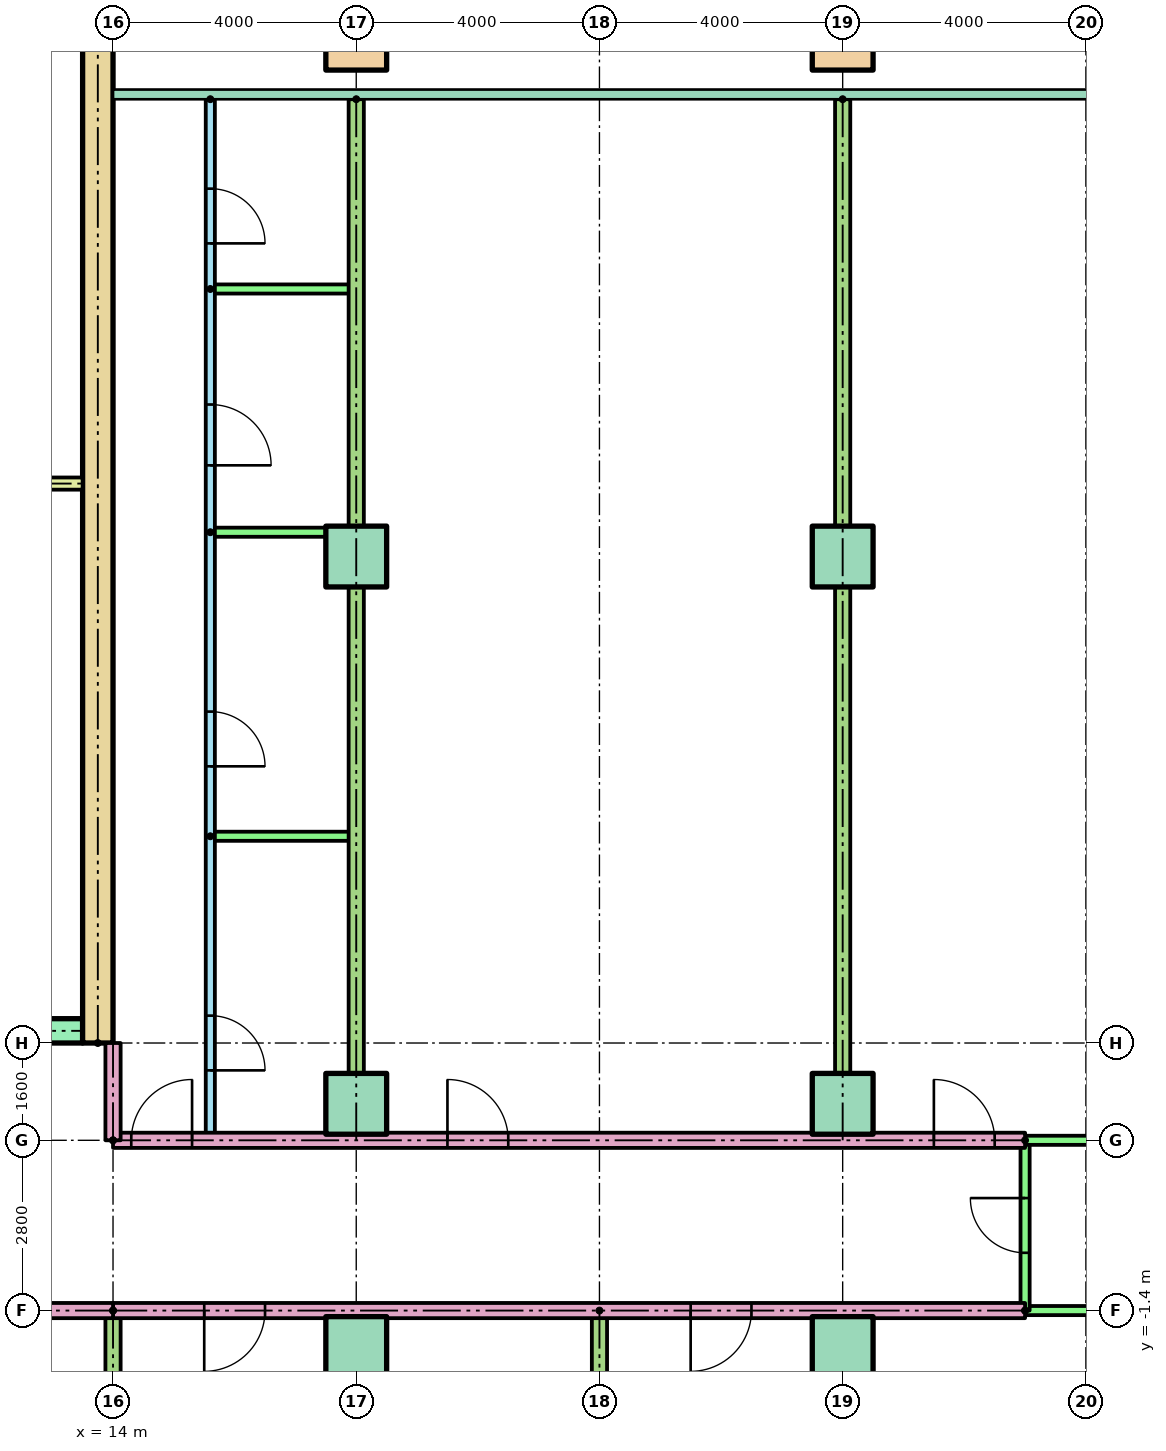
"""IFC4 building model, lengths in metres.
Left out: names, types, materials, properties, quantities, classifications, styles, units other than length and angle.
Written with IfcOpenShell. Run it as: python <this file> out.ifc"""

import sys

from ifc_helpers import new_model, si_unit, direction, frame, frame_2d, origin, origin_2d, place, context, subcontext, project, spatial, rectangle, hollow_rectangle, extrude, element, fill, save


model = new_model("IFC4")
c1 = context("Model", 3, precision=1e-05, world=origin(), true_north=direction((0.0, 1.0)))
c2 = subcontext(c1, "Body", "Model", "MODEL_VIEW")
j1 = project(units=[si_unit("LENGTHUNIT", "METRE"), si_unit("PLANEANGLEUNIT", "RADIAN")], contexts=[c1])
p1 = place(None, origin())
s1 = spatial("IfcSite", under=j1, at=p1, CompositionType="ELEMENT")
p2 = place(p1, origin())
s2 = spatial("IfcBuilding", under=s1, at=p2, CompositionType="ELEMENT")
p3 = place(p2, frame((0.0, 0.0, 29.9)))
s3 = spatial("IfcBuildingStorey", under=s2, at=p3, CompositionType="ELEMENT", Elevation=29.9)
for number, where in (
    (1, (18.0, -2.0, 0.0)),
    (2, (26.0, -2.0, 0.0)),
    (3, (18.0, 2.0, 0.0)),
    (4, (26.0, 2.0, 0.0)),
    (5, (18.0, 11.0, 0.0)),
    (6, (26.0, 11.0, 0.0)),
):
    element("IfcColumn", number, at=place(p3, frame(where)), inside=s3, PredefinedType="COLUMN", context=c2, shape_type="SweptSolid", body=[
        extrude(rectangle(XDim=1.0, YDim=1.0, at=origin_2d()), origin(), (0.0, 0.0, 1.0), 3.9),
    ])
for number, where in (
    (7, (18.0, 19.5, 0.0)),
    (8, (26.0, 19.5, 0.0)),
):
    element("IfcColumn", number, at=place(p3, frame(where)), inside=s3, PredefinedType="COLUMN", context=c2, shape_type="SweptSolid", body=[
        extrude(hollow_rectangle(XDim=1.0, YDim=1.0, WallThickness=0.05, at=origin_2d()), origin(), (0.0, 0.0, 1.0), 3.9),
    ])
p4 = place(p3, frame((13.75, 3.0, 0.0), z_axis=(0.0, 0.0, 1.0), x_axis=(0.0, 1.0, 0.0)))
e9 = element("IfcWall", 9, at=p4, inside=s3, PredefinedType="SHEAR", context=c2, shape_type="SweptSolid", body=[
    extrude(rectangle(XDim=17.0, YDim=0.5, at=frame_2d((8.5, 0.0))), origin(), (0.0, 0.0, 1.0), 3.6),
])
p5 = place(p3, frame((-13.5, 3.2, 0.0)))
e10 = element("IfcWall", 10, at=p5, inside=s3, PredefinedType="SHEAR", context=c2, shape_type="SweptSolid", body=[
    extrude(rectangle(XDim=27.0, YDim=0.4, at=frame_2d((13.5, 0.0))), origin(), (0.0, 0.0, 1.0), 3.6),
])
p6 = place(p5, frame((6.861, 0.0, 0.0)))
e11 = element("IfcOpeningElement", 11, at=p6, cuts=e10, PredefinedType="OPENING", context=c2, shape_type="SweptSolid", body=[
    extrude(rectangle(XDim=1.1, YDim=2.1, at=frame_2d((0.55, 1.05))), frame((0.0, 0.21, 0.0), z_axis=(0.0, -1.0, 0.0), x_axis=(1.0, 0.0, 0.0)), (0.0, 0.0, 1.0), 0.42),
])
p7 = place(p5, frame((9.906, 0.0, 0.0)))
e12 = element("IfcOpeningElement", 12, at=p7, cuts=e10, PredefinedType="OPENING", context=c2, shape_type="SweptSolid", body=[
    extrude(rectangle(XDim=1.1, YDim=2.1, at=frame_2d((0.55, 1.05))), frame((0.0, 0.21, 0.0), z_axis=(0.0, -1.0, 0.0), x_axis=(1.0, 0.0, 0.0)), (0.0, 0.0, 1.0), 0.42),
])
p8 = place(p5, frame((15.994, 0.0, 0.0)))
e13 = element("IfcOpeningElement", 13, at=p8, cuts=e10, PredefinedType="OPENING", context=c2, shape_type="SweptSolid", body=[
    extrude(rectangle(XDim=1.1, YDim=2.1, at=frame_2d((0.55, 1.05))), frame((0.0, 0.21, 0.0), z_axis=(0.0, -1.0, 0.0), x_axis=(1.0, 0.0, 0.0)), (0.0, 0.0, 1.0), 0.42),
])
p9 = place(p5, frame((19.039, 0.0, 0.0)))
e14 = element("IfcOpeningElement", 14, at=p9, cuts=e10, PredefinedType="OPENING", context=c2, shape_type="SweptSolid", body=[
    extrude(rectangle(XDim=1.1, YDim=2.1, at=frame_2d((0.55, 1.05))), frame((0.0, 0.21, 0.0), z_axis=(0.0, -1.0, 0.0), x_axis=(1.0, 0.0, 0.0)), (0.0, 0.0, 1.0), 0.42),
])
p10 = place(p5, frame((12.6, 0.0, 0.0)))
e15 = element("IfcOpeningElement", 15, at=p10, cuts=e10, PredefinedType="OPENING", context=c2, shape_type="SweptSolid", body=[
    extrude(rectangle(XDim=1.8, YDim=2.1, at=frame_2d((0.9, 1.05))), frame((0.0, 0.21, 0.0), z_axis=(0.0, -1.0, 0.0), x_axis=(1.0, 0.0, 0.0)), (0.0, 0.0, 1.0), 0.42),
])
p11 = place(p3, frame((9.6, 12.2, 0.0)))
e16 = element("IfcWall", 16, at=p11, inside=s3, PredefinedType="PARTITIONING", context=c2, shape_type="SweptSolid", body=[
    extrude(rectangle(XDim=3.9, YDim=0.2, at=frame_2d((1.95, 0.0))), origin(), (0.0, 0.0, 1.0), 3.6),
])
p12 = place(p3, frame((29.0, -1.4, 0.0), z_axis=(0.0, 0.0, 1.0), x_axis=(-1.0, 0.0, 0.0)))
e17 = element("IfcWall", 17, at=p12, inside=s3, PredefinedType="PARTITIONING", context=c2, shape_type="SweptSolid", body=[
    extrude(rectangle(XDim=15.0, YDim=0.25, at=frame_2d((7.5, 0.0))), origin(), (0.0, 0.0, 1.0), 3.1),
])
p13 = place(p12, frame((12.5, 0.0, 0.0)))
e18 = element("IfcOpeningElement", 18, at=p13, cuts=e17, PredefinedType="OPENING", context=c2, shape_type="SweptSolid", body=[
    extrude(rectangle(XDim=1.0, YDim=2.1, at=frame_2d((0.5, 1.05))), frame((0.0, 0.135, 0.0), z_axis=(0.0, -1.0, 0.0), x_axis=(1.0, 0.0, 0.0)), (0.0, 0.0, 1.0), 0.27),
])
p14 = place(p12, frame((4.5, 0.0, 0.0)))
e19 = element("IfcOpeningElement", 19, at=p14, cuts=e17, PredefinedType="OPENING", context=c2, shape_type="SweptSolid", body=[
    extrude(rectangle(XDim=1.0, YDim=2.1, at=frame_2d((0.5, 1.05))), frame((0.0, 0.135, 0.0), z_axis=(0.0, -1.0, 0.0), x_axis=(1.0, 0.0, 0.0)), (0.0, 0.0, 1.0), 0.27),
])
p15 = place(p3, frame((36.53, -1.4, 0.0), z_axis=(0.0, 0.0, 1.0), x_axis=(-1.0, 0.0, 0.0)))
e20 = element("IfcWall", 20, at=p15, inside=s3, PredefinedType="PARTITIONING", context=c2, shape_type="SweptSolid", body=[
    extrude(rectangle(XDim=7.53, YDim=0.15, at=frame_2d((3.765, 0.0))), origin(), (0.0, 0.0, 1.0), 3.1),
])
p16 = place(p3, frame((29.0, -1.4, 0.0), z_axis=(0.0, 0.0, 1.0), x_axis=(0.0, 1.0, 0.0)))
e21 = element("IfcWall", 21, at=p16, inside=s3, PredefinedType="PARTITIONING", context=c2, shape_type="SweptSolid", body=[
    extrude(rectangle(XDim=2.8, YDim=0.15, at=frame_2d((1.4, 0.0))), origin(), (0.0, 0.0, 1.0), 3.1),
])
p17 = place(p16, frame((0.95, 0.0, 0.0)))
e22 = element("IfcOpeningElement", 22, at=p17, cuts=e21, PredefinedType="OPENING", context=c2, shape_type="SweptSolid", body=[
    extrude(rectangle(XDim=0.9, YDim=2.1, at=frame_2d((0.45, 1.05))), frame((0.0, 0.085, 0.0), z_axis=(0.0, -1.0, 0.0), x_axis=(1.0, 0.0, 0.0)), (0.0, 0.0, 1.0), 0.17),
])
for number, where, z_axis, x_axis in (
    (23, (14.0, -1.4, 0.0), (0.0, 0.0, 1.0), (0.0, -1.0, 0.0)),
    (24, (22.0, -1.4, 0.0), (0.0, 0.0, 1.0), (0.0, -1.0, 0.0)),
):
    element("IfcWall", number, at=place(p3, frame(where, z_axis=z_axis, x_axis=x_axis)), inside=s3, PredefinedType="PARTITIONING", context=c2, shape_type="SweptSolid", body=[
        extrude(rectangle(XDim=14.721, YDim=0.25, at=frame_2d((7.361, 0.0))), origin(), (0.0, 0.0, 1.0), 3.1),
    ])
p18 = place(p3, frame((14.0, 1.4, 0.0)))
e25 = element("IfcWall", 25, at=p18, inside=s3, PredefinedType="PARTITIONING", context=c2, shape_type="SweptSolid", body=[
    extrude(rectangle(XDim=15.0, YDim=0.25, at=frame_2d((7.5, 0.0))), origin(), (0.0, 0.0, 1.0), 3.1),
])
p19 = place(p18, frame((0.3, 0.0, 0.0)))
e26 = element("IfcOpeningElement", 26, at=p19, cuts=e25, PredefinedType="OPENING", context=c2, shape_type="SweptSolid", body=[
    extrude(rectangle(XDim=1.0, YDim=2.1, at=frame_2d((0.5, 1.05))), frame((0.0, 0.135, 0.0), z_axis=(0.0, -1.0, 0.0), x_axis=(1.0, 0.0, 0.0)), (0.0, 0.0, 1.0), 0.27),
])
p20 = place(p18, frame((5.5, 0.0, 0.0)))
e27 = element("IfcOpeningElement", 27, at=p20, cuts=e25, PredefinedType="OPENING", context=c2, shape_type="SweptSolid", body=[
    extrude(rectangle(XDim=1.0, YDim=2.1, at=frame_2d((0.5, 1.05))), frame((0.0, 0.135, 0.0), z_axis=(0.0, -1.0, 0.0), x_axis=(1.0, 0.0, 0.0)), (0.0, 0.0, 1.0), 0.27),
])
p21 = place(p18, frame((13.5, 0.0, 0.0)))
e28 = element("IfcOpeningElement", 28, at=p21, cuts=e25, PredefinedType="OPENING", context=c2, shape_type="SweptSolid", body=[
    extrude(rectangle(XDim=1.0, YDim=2.1, at=frame_2d((0.5, 1.05))), frame((0.0, 0.135, 0.0), z_axis=(0.0, -1.0, 0.0), x_axis=(1.0, 0.0, 0.0)), (0.0, 0.0, 1.0), 0.27),
])
p22 = place(p3, frame((29.0, 1.4, 0.0)))
e29 = element("IfcWall", 29, at=p22, inside=s3, PredefinedType="PARTITIONING", context=c2, shape_type="SweptSolid", body=[
    extrude(rectangle(XDim=7.53, YDim=0.15, at=frame_2d((3.765, 0.0))), origin(), (0.0, 0.0, 1.0), 3.1),
])
p23 = place(p3, frame((15.6, 18.521, 0.0), z_axis=(0.0, 0.0, 1.0), x_axis=(0.0, -1.0, 0.0)))
e30 = element("IfcWall", 30, at=p23, inside=s3, PredefinedType="PARTITIONING", context=c2, shape_type="SweptSolid", body=[
    extrude(rectangle(XDim=17.121, YDim=0.15, at=frame_2d((8.561, 0.0))), origin(), (0.0, 0.0, 1.0), 3.1),
])
p24 = place(p23, frame((15.071, 0.0, 0.0)))
e31 = element("IfcOpeningElement", 31, at=p24, cuts=e30, PredefinedType="OPENING", context=c2, shape_type="SweptSolid", body=[
    extrude(rectangle(XDim=0.9, YDim=2.1, at=frame_2d((0.45, 1.05))), frame((0.0, 0.085, 0.0), z_axis=(0.0, -1.0, 0.0), x_axis=(1.0, 0.0, 0.0)), (0.0, 0.0, 1.0), 0.17),
])
p25 = place(p23, frame((10.071, 0.0, 0.0)))
e32 = element("IfcOpeningElement", 32, at=p25, cuts=e30, PredefinedType="OPENING", context=c2, shape_type="SweptSolid", body=[
    extrude(rectangle(XDim=0.9, YDim=2.1, at=frame_2d((0.45, 1.05))), frame((0.0, 0.085, 0.0), z_axis=(0.0, -1.0, 0.0), x_axis=(1.0, 0.0, 0.0)), (0.0, 0.0, 1.0), 0.17),
])
p26 = place(p23, frame((5.021, 0.0, 0.0)))
e33 = element("IfcOpeningElement", 33, at=p26, cuts=e30, PredefinedType="OPENING", context=c2, shape_type="SweptSolid", body=[
    extrude(rectangle(XDim=1.0, YDim=2.1, at=frame_2d((0.5, 1.05))), frame((0.0, 0.085, 0.0), z_axis=(0.0, -1.0, 0.0), x_axis=(1.0, 0.0, 0.0)), (0.0, 0.0, 1.0), 0.17),
])
p27 = place(p23, frame((1.471, 0.0, 0.0)))
e34 = element("IfcOpeningElement", 34, at=p27, cuts=e30, PredefinedType="OPENING", context=c2, shape_type="SweptSolid", body=[
    extrude(rectangle(XDim=0.9, YDim=2.1, at=frame_2d((0.45, 1.05))), frame((0.0, 0.085, 0.0), z_axis=(0.0, -1.0, 0.0), x_axis=(1.0, 0.0, 0.0)), (0.0, 0.0, 1.0), 0.17),
])
for number, where in (
    (35, (15.6, 6.4, 0.0)),
    (36, (15.6, 11.4, 0.0)),
    (37, (15.6, 15.4, 0.0)),
):
    element("IfcWall", number, at=place(p3, frame(where)), inside=s3, PredefinedType="PARTITIONING", context=c2, shape_type="SweptSolid", body=[
        extrude(rectangle(XDim=2.4, YDim=0.15, at=frame_2d((1.2, 0.0))), origin(), (0.0, 0.0, 1.0), 3.1),
    ])
for number, where, z_axis, x_axis in (
    (38, (18.0, 18.521, 0.0), (0.0, 0.0, 1.0), (0.0, -1.0, 0.0)),
    (39, (26.0, 18.521, 0.0), (0.0, 0.0, 1.0), (0.0, -1.0, 0.0)),
):
    element("IfcWall", number, at=place(p3, frame(where, z_axis=z_axis, x_axis=x_axis)), inside=s3, PredefinedType="PARTITIONING", context=c2, shape_type="SweptSolid", body=[
        extrude(rectangle(XDim=17.121, YDim=0.25, at=frame_2d((8.561, 0.0))), origin(), (0.0, 0.0, 1.0), 3.1),
    ])
p28 = place(p3, frame((14.0, -1.4, 0.0), z_axis=(0.0, 0.0, 1.0), x_axis=(-1.0, 0.0, 0.0)))
e40 = element("IfcWall", 40, at=p28, inside=s3, PredefinedType="PARTITIONING", context=c2, shape_type="SweptSolid", body=[
    extrude(rectangle(XDim=28.0, YDim=0.25, at=frame_2d((14.0, 0.0))), origin(), (0.0, 0.0, 1.0), 3.1),
])
p29 = place(p28, frame((25.5, 0.0, 0.0)))
e41 = element("IfcOpeningElement", 41, at=p29, cuts=e40, PredefinedType="OPENING", context=c2, shape_type="SweptSolid", body=[
    extrude(rectangle(XDim=1.0, YDim=2.1, at=frame_2d((0.5, 1.05))), frame((0.0, 0.135, 0.0), z_axis=(0.0, -1.0, 0.0), x_axis=(1.0, 0.0, 0.0)), (0.0, 0.0, 1.0), 0.27),
])
p30 = place(p28, frame((1.5, 0.0, 0.0)))
e42 = element("IfcOpeningElement", 42, at=p30, cuts=e40, PredefinedType="OPENING", context=c2, shape_type="SweptSolid", body=[
    extrude(rectangle(XDim=1.0, YDim=2.1, at=frame_2d((0.5, 1.05))), frame((0.0, 0.135, 0.0), z_axis=(0.0, -1.0, 0.0), x_axis=(1.0, 0.0, 0.0)), (0.0, 0.0, 1.0), 0.27),
])
p31 = place(p3, frame((14.0, 1.4, 0.0), z_axis=(0.0, 0.0, 1.0), x_axis=(0.0, 1.0, 0.0)))
e43 = element("IfcWall", 43, at=p31, inside=s3, PredefinedType="PARTITIONING", context=c2, shape_type="SweptSolid", body=[
    extrude(rectangle(XDim=1.6, YDim=0.25, at=frame_2d((0.8, 0.0))), origin(), (0.0, 0.0, 1.0), 3.1),
])
p32 = place(p13, origin())
e44 = element("IfcDoor", 44, at=p32, inside=s3, OperationType="SINGLE_SWING_RIGHT", PredefinedType="DOOR", context=c2, shape_type="SweptSolid", body=[
    extrude(rectangle(XDim=1.0, YDim=2.1, at=frame_2d((0.5, 1.05))), frame((0.0, 0.025, 0.0), z_axis=(0.0, -1.0, 0.0), x_axis=(1.0, 0.0, 0.0)), (0.0, 0.0, 1.0), 0.05),
])
fill(e18, e44)
p33 = place(p14, origin())
e45 = element("IfcDoor", 45, at=p33, inside=s3, OperationType="SINGLE_SWING_RIGHT", PredefinedType="DOOR", context=c2, shape_type="SweptSolid", body=[
    extrude(rectangle(XDim=1.0, YDim=2.1, at=frame_2d((0.5, 1.05))), frame((0.0, 0.025, 0.0), z_axis=(0.0, -1.0, 0.0), x_axis=(1.0, 0.0, 0.0)), (0.0, 0.0, 1.0), 0.05),
])
fill(e19, e45)
p34 = place(p17, origin())
e46 = element("IfcDoor", 46, at=p34, inside=s3, OperationType="SINGLE_SWING_RIGHT", PredefinedType="DOOR", context=c2, shape_type="SweptSolid", body=[
    extrude(rectangle(XDim=0.9, YDim=2.1, at=frame_2d((0.45, 1.05))), frame((0.0, 0.025, 0.0), z_axis=(0.0, -1.0, 0.0), x_axis=(1.0, 0.0, 0.0)), (0.0, 0.0, 1.0), 0.05),
])
fill(e22, e46)
p35 = place(p24, origin())
e47 = element("IfcDoor", 47, at=p35, inside=s3, OperationType="SINGLE_SWING_RIGHT", PredefinedType="DOOR", context=c2, shape_type="SweptSolid", body=[
    extrude(rectangle(XDim=0.9, YDim=2.1, at=frame_2d((0.45, 1.05))), frame((0.0, 0.025, 0.0), z_axis=(0.0, -1.0, 0.0), x_axis=(1.0, 0.0, 0.0)), (0.0, 0.0, 1.0), 0.05),
])
fill(e31, e47)
p36 = place(p25, origin())
e48 = element("IfcDoor", 48, at=p36, inside=s3, OperationType="SINGLE_SWING_RIGHT", PredefinedType="DOOR", context=c2, shape_type="SweptSolid", body=[
    extrude(rectangle(XDim=0.9, YDim=2.1, at=frame_2d((0.45, 1.05))), frame((0.0, 0.025, 0.0), z_axis=(0.0, -1.0, 0.0), x_axis=(1.0, 0.0, 0.0)), (0.0, 0.0, 1.0), 0.05),
])
fill(e32, e48)
p37 = place(p26, origin())
e49 = element("IfcDoor", 49, at=p37, inside=s3, OperationType="SINGLE_SWING_RIGHT", PredefinedType="DOOR", context=c2, shape_type="SweptSolid", body=[
    extrude(rectangle(XDim=1.0, YDim=2.1, at=frame_2d((0.5, 1.05))), frame((0.0, 0.025, 0.0), z_axis=(0.0, -1.0, 0.0), x_axis=(1.0, 0.0, 0.0)), (0.0, 0.0, 1.0), 0.05),
])
fill(e33, e49)
p38 = place(p27, origin())
e50 = element("IfcDoor", 50, at=p38, inside=s3, OperationType="SINGLE_SWING_RIGHT", PredefinedType="DOOR", context=c2, shape_type="SweptSolid", body=[
    extrude(rectangle(XDim=0.9, YDim=2.1, at=frame_2d((0.45, 1.05))), frame((0.0, 0.025, 0.0), z_axis=(0.0, -1.0, 0.0), x_axis=(1.0, 0.0, 0.0)), (0.0, 0.0, 1.0), 0.05),
])
fill(e34, e50)
p39 = place(p19, origin())
e51 = element("IfcDoor", 51, at=p39, inside=s3, OperationType="SINGLE_SWING_RIGHT", PredefinedType="DOOR", context=c2, shape_type="SweptSolid", body=[
    extrude(rectangle(XDim=1.0, YDim=2.1, at=frame_2d((0.5, 1.05))), frame((0.0, 0.025, 0.0), z_axis=(0.0, -1.0, 0.0), x_axis=(1.0, 0.0, 0.0)), (0.0, 0.0, 1.0), 0.05),
])
fill(e26, e51)
p40 = place(p20, origin())
e52 = element("IfcDoor", 52, at=p40, inside=s3, OperationType="SINGLE_SWING_LEFT", PredefinedType="DOOR", context=c2, shape_type="SweptSolid", body=[
    extrude(rectangle(XDim=1.0, YDim=2.1, at=frame_2d((0.5, 1.05))), frame((0.0, 0.025, 0.0), z_axis=(0.0, -1.0, 0.0), x_axis=(1.0, 0.0, 0.0)), (0.0, 0.0, 1.0), 0.05),
])
fill(e27, e52)
p41 = place(p21, origin())
e53 = element("IfcDoor", 53, at=p41, inside=s3, OperationType="SINGLE_SWING_LEFT", PredefinedType="DOOR", context=c2, shape_type="SweptSolid", body=[
    extrude(rectangle(XDim=1.0, YDim=2.1, at=frame_2d((0.5, 1.05))), frame((0.0, 0.025, 0.0), z_axis=(0.0, -1.0, 0.0), x_axis=(1.0, 0.0, 0.0)), (0.0, 0.0, 1.0), 0.05),
])
fill(e28, e53)
save(model, sys.argv[1])
